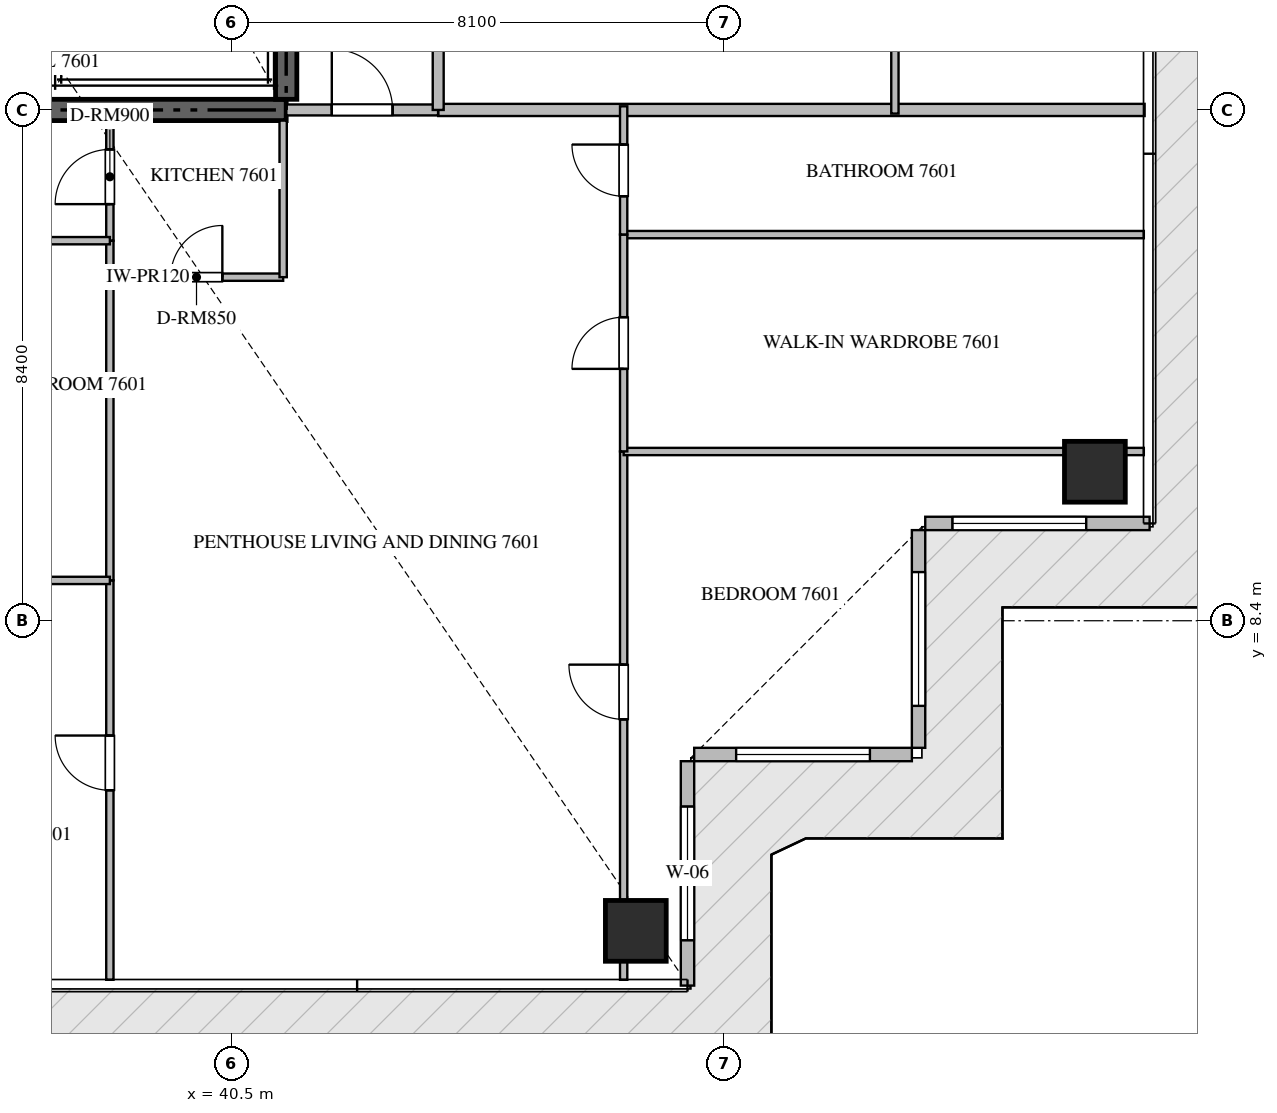
"""IFC4 building model, lengths in metres.
Left out: names, types, materials, properties, quantities, classifications, styles, units other than length and angle.
Written with IfcOpenShell. Run it as: python <this file> out.ifc"""

import sys

from ifc_helpers import new_model, si_unit, direction, frame, frame_2d, origin, origin_2d, place, context, subcontext, project, spatial, rectangle, extrude, source, transform, mapped, element, fill, save


model = new_model("IFC4")
c1 = context("Model", 3, precision=1e-05, world=origin(), true_north=direction((0.0, 1.0)))
c2 = subcontext(c1, "Body", "Model", "MODEL_VIEW")
j1 = project(units=[si_unit("LENGTHUNIT", "METRE"), si_unit("PLANEANGLEUNIT", "RADIAN")], contexts=[c1])
p1 = place(None, origin())
s1 = spatial("IfcSite", under=j1, at=p1, CompositionType="ELEMENT")
p2 = place(p1, origin())
s2 = spatial("IfcBuilding", under=s1, at=p2, CompositionType="ELEMENT")
p3 = place(p2, frame((0.0, 0.0, 305.6)))
s3 = spatial("IfcBuildingStorey", under=s2, at=p3, CompositionType="ELEMENT", Elevation=305.6)
p4 = place(p3, frame((23.4, 16.8, -0.26), z_axis=(0.0, 0.0, 1.0), x_axis=(1.0, 0.0, 0.0)))
e1 = element("IfcWall", 1, at=p4, inside=s3, PredefinedType="SHEAR", context=c2, shape_type="SweptSolid", body=[
    extrude(rectangle(XDim=18.0, YDim=0.35, at=frame_2d((9.0, 0.0))), origin(), (0.0, 0.0, 1.0), 4.048),
])
p5 = place(p3, frame((41.4, 16.975, -0.26), z_axis=(0.0, 0.0, 1.0), x_axis=(0.0, 1.0, 0.0)))
e2 = element("IfcWall", 2, at=p5, inside=s3, PredefinedType="SHEAR", context=c2, shape_type="SweptSolid", body=[
    extrude(rectangle(XDim=8.375, YDim=0.35, at=frame_2d((4.188, 0.0))), origin(), (0.0, 0.0, 1.0), 4.048),
])
m1 = source(origin(), c2, "Body", "SweptSolid", [
    extrude(rectangle(XDim=1.0, YDim=1.0, at=origin_2d()), origin(), (0.0, 0.0, 1.0), 4.05),
])
for number, where, z_axis, x_axis in (
    (3, (47.15, 3.3, -0.26), (0.0, 0.0, 1.0), (1.0, 0.0, 0.0)),
    (4, (54.7, 10.85, -0.26), (0.0, 0.0, 1.0), (1.0, 0.0, 0.0)),
):
    element("IfcColumn", number, at=place(p3, frame(where, z_axis=z_axis, x_axis=x_axis)), inside=s3, PredefinedType="COLUMN", context=c2, shape_type="MappedRepresentation", body=[
        mapped(m1, transform((0.0, 0.0, 0.0), scale=1.0)),
    ])
p6 = place(p3, frame((48.0, 2.4, 0.0), z_axis=(0.0, 0.0, 1.0), x_axis=(0.0, 1.0, 0.0)))
e5 = element("IfcWall", 5, at=p6, inside=s3, PredefinedType="ELEMENTEDWALL", context=c2, shape_type="SweptSolid", body=[
    extrude(rectangle(XDim=3.69, YDim=0.22, at=frame_2d((1.845, 0.0))), origin(), (0.0, 0.0, 1.0), 3.775),
])
p7 = place(p6, frame((0.745, 0.0, 0.65)))
e6 = element("IfcOpeningElement", 6, at=p7, cuts=e5, PredefinedType="OPENING", context=c2, shape_type="SweptSolid", body=[
    extrude(rectangle(XDim=2.2, YDim=2.4, at=frame_2d((1.1, 1.2))), frame((0.0, 0.12, 0.0), z_axis=(0.0, -1.0, 0.0), x_axis=(1.0, 0.0, 0.0)), (0.0, 0.0, 1.0), 0.24),
])
p8 = place(p3, frame((48.11, 6.2, 0.0), z_axis=(0.0, 0.0, 1.0), x_axis=(1.0, 0.0, 0.0)))
e7 = element("IfcWall", 7, at=p8, inside=s3, PredefinedType="ELEMENTEDWALL", context=c2, shape_type="SweptSolid", body=[
    extrude(rectangle(XDim=3.58, YDim=0.22, at=frame_2d((1.79, 0.0))), origin(), (0.0, 0.0, 1.0), 3.775),
])
p9 = place(p8, frame((0.69, 0.0, 0.65)))
e8 = element("IfcOpeningElement", 8, at=p9, cuts=e7, PredefinedType="OPENING", context=c2, shape_type="SweptSolid", body=[
    extrude(rectangle(XDim=2.2, YDim=2.4, at=frame_2d((1.1, 1.2))), frame((0.0, 0.12, 0.0), z_axis=(0.0, -1.0, 0.0), x_axis=(1.0, 0.0, 0.0)), (0.0, 0.0, 1.0), 0.24),
])
p10 = place(p3, frame((51.8, 6.31, 0.0), z_axis=(0.0, 0.0, 1.0), x_axis=(0.0, 1.0, 0.0)))
e9 = element("IfcWall", 9, at=p10, inside=s3, PredefinedType="ELEMENTEDWALL", context=c2, shape_type="SweptSolid", body=[
    extrude(rectangle(XDim=3.58, YDim=0.22, at=frame_2d((1.79, 0.0))), origin(), (0.0, 0.0, 1.0), 3.775),
])
p11 = place(p10, frame((0.69, 0.0, 0.65)))
e10 = element("IfcOpeningElement", 10, at=p11, cuts=e9, PredefinedType="OPENING", context=c2, shape_type="SweptSolid", body=[
    extrude(rectangle(XDim=2.2, YDim=2.4, at=frame_2d((1.1, 1.2))), frame((0.0, 0.12, 0.0), z_axis=(0.0, -1.0, 0.0), x_axis=(1.0, 0.0, 0.0)), (0.0, 0.0, 1.0), 0.24),
])
p12 = place(p3, frame((51.91, 10.0, 0.0), z_axis=(0.0, 0.0, 1.0), x_axis=(1.0, 0.0, 0.0)))
e11 = element("IfcWall", 11, at=p12, inside=s3, PredefinedType="ELEMENTEDWALL", context=c2, shape_type="SweptSolid", body=[
    extrude(rectangle(XDim=3.69, YDim=0.22, at=frame_2d((1.845, 0.0))), origin(), (0.0, 0.0, 1.0), 3.775),
])
p13 = place(p12, frame((0.447, 0.0, 0.65)))
e12 = element("IfcOpeningElement", 12, at=p13, cuts=e11, PredefinedType="OPENING", context=c2, shape_type="SweptSolid", body=[
    extrude(rectangle(XDim=2.2, YDim=2.4, at=frame_2d((1.1, 1.2))), frame((0.0, 0.12, 0.0), z_axis=(0.0, -1.0, 0.0), x_axis=(1.0, 0.0, 0.0)), (0.0, 0.0, 1.0), 0.24),
])
p14 = place(p3, frame((43.9, 16.8, 0.0), z_axis=(0.0, 0.0, 1.0), x_axis=(1.0, 0.0, 0.0)))
e13 = element("IfcWall", 13, at=p14, inside=s3, PredefinedType="PARTITIONING", context=c2, shape_type="SweptSolid", body=[
    extrude(rectangle(XDim=11.618, YDim=0.2, at=frame_2d((5.809, 0.0))), origin(), (0.0, 0.0, 1.0), 3.79),
])
p15 = place(p3, frame((41.402, 16.8, 0.0), z_axis=(0.0, 0.0, 1.0), x_axis=(1.0, 0.0, 0.0)))
e14 = element("IfcWall", 14, at=p15, inside=s3, PredefinedType="PARTITIONING", context=c2, shape_type="SweptSolid", body=[
    extrude(rectangle(XDim=2.496, YDim=0.18, at=frame_2d((1.248, 0.0))), origin(), (0.0, 0.0, 1.0), 3.79),
])
p16 = place(p15, frame((0.748, 0.0, 0.0)))
e15 = element("IfcOpeningElement", 15, at=p16, cuts=e14, PredefinedType="OPENING", context=c2, shape_type="SweptSolid", body=[
    extrude(rectangle(XDim=1.0, YDim=2.15, at=frame_2d((0.5, 1.075))), frame((0.0, 0.1, 0.0), z_axis=(0.0, -1.0, 0.0), x_axis=(1.0, 0.0, 0.0)), (0.0, 0.0, 1.0), 0.2),
])
p17 = place(p3, frame((43.9, 16.8, 0.0), z_axis=(0.0, 0.0, 1.0), x_axis=(0.0, 1.0, 0.0)))
e16 = element("IfcWall", 16, at=p17, inside=s3, PredefinedType="PARTITIONING", context=c2, shape_type="SweptSolid", body=[
    extrude(rectangle(XDim=16.8, YDim=0.18, at=frame_2d((8.4, 0.0))), origin(), (0.0, 0.0, 1.0), 3.79),
])
p18 = place(p17, frame((14.5, 0.0, 0.0)))
e17 = element("IfcOpeningElement", 17, at=p18, cuts=e16, PredefinedType="OPENING", context=c2, shape_type="SweptSolid", body=[
    extrude(rectangle(XDim=1.0, YDim=2.15, at=frame_2d((0.5, 1.075))), frame((0.0, 0.1, 0.0), z_axis=(0.0, -1.0, 0.0), x_axis=(1.0, 0.0, 0.0)), (0.0, 0.0, 1.0), 0.2),
])
p19 = place(p3, frame((38.5, 14.05, 0.0), z_axis=(0.0, 0.0, 1.0), x_axis=(1.0, 0.0, 0.0)))
e18 = element("IfcWall", 18, at=p19, inside=s3, PredefinedType="PARTITIONING", context=c2, shape_type="SweptSolid", body=[
    extrude(rectangle(XDim=2.85, YDim=0.12, at=frame_2d((1.425, 0.0))), origin(), (0.0, 0.0, 1.0), 3.512),
])
p20 = place(p19, frame((1.0, 0.0, 0.0)))
e19 = element("IfcOpeningElement", 19, at=p20, cuts=e18, PredefinedType="OPENING", context=c2, shape_type="SweptSolid", body=[
    extrude(rectangle(XDim=0.85, YDim=2.1, at=frame_2d((0.425, 1.05))), frame((0.0, 0.07, 0.0), z_axis=(0.0, -1.0, 0.0), x_axis=(1.0, 0.0, 0.0)), (0.0, 0.0, 1.0), 0.14),
])
p21 = place(p3, frame((41.35, 14.05, 0.0), z_axis=(0.0, 0.0, 1.0), x_axis=(0.0, 1.0, 0.0)))
e20 = element("IfcWall", 20, at=p21, inside=s3, PredefinedType="PARTITIONING", context=c2, shape_type="SweptSolid", body=[
    extrude(rectangle(XDim=2.575, YDim=0.12, at=frame_2d((1.288, 0.0))), origin(), (0.0, 0.0, 1.0), 3.79),
])
p22 = place(p3, frame((38.5, 14.65, 0.0), z_axis=(0.0, 0.0, 1.0), x_axis=(0.0, 1.0, 0.0)))
e21 = element("IfcWall", 21, at=p22, inside=s3, PredefinedType="PARTITIONING", context=c2, shape_type="SweptSolid", body=[
    extrude(rectangle(XDim=1.975, YDim=0.12, at=frame_2d((0.988, 0.0))), origin(), (0.0, 0.0, 1.0), 3.79),
])
p23 = place(p22, frame((0.601, 0.0, 0.0)))
e22 = element("IfcOpeningElement", 22, at=p23, cuts=e21, PredefinedType="OPENING", context=c2, shape_type="SweptSolid", body=[
    extrude(rectangle(XDim=0.9, YDim=2.1, at=frame_2d((0.45, 1.05))), frame((0.0, 0.07, 0.0), z_axis=(0.0, -1.0, 0.0), x_axis=(1.0, 0.0, 0.0)), (0.0, 0.0, 1.0), 0.14),
])
p24 = place(p3, frame((38.5, 2.495, 0.0), z_axis=(0.0, 0.0, 1.0), x_axis=(0.0, 1.0, 0.0)))
e23 = element("IfcWall", 23, at=p24, inside=s3, PredefinedType="PARTITIONING", context=c2, shape_type="SweptSolid", body=[
    extrude(rectangle(XDim=6.568, YDim=0.12, at=frame_2d((3.284, 0.0))), origin(), (0.0, 0.0, 1.0), 3.79),
])
p25 = place(p24, frame((3.117, 0.0, 0.0)))
e24 = element("IfcOpeningElement", 24, at=p25, cuts=e23, PredefinedType="OPENING", context=c2, shape_type="SweptSolid", body=[
    extrude(rectangle(XDim=0.9, YDim=2.1, at=frame_2d((0.45, 1.05))), frame((0.0, 0.07, 0.0), z_axis=(0.0, -1.0, 0.0), x_axis=(1.0, 0.0, 0.0)), (0.0, 0.0, 1.0), 0.14),
])
p26 = place(p3, frame((38.5, 9.065, 0.0), z_axis=(0.0, 0.0, 1.0), x_axis=(0.0, 1.0, 0.0)))
e25 = element("IfcWall", 25, at=p26, inside=s3, PredefinedType="PARTITIONING", context=c2, shape_type="SweptSolid", body=[
    extrude(rectangle(XDim=5.583, YDim=0.12, at=frame_2d((2.792, 0.0))), origin(), (0.0, 0.0, 1.0), 3.79),
])
p27 = place(p3, frame((33.35, 9.063, 0.0), z_axis=(0.0, 0.0, 1.0), x_axis=(1.0, 0.0, 0.0)))
e26 = element("IfcWall", 26, at=p27, inside=s3, PredefinedType="PARTITIONING", context=c2, shape_type="SweptSolid", body=[
    extrude(rectangle(XDim=5.15, YDim=0.12, at=frame_2d((2.575, 0.0))), origin(), (0.0, 0.0, 1.0), 3.79),
])
p28 = place(p3, frame((35.452, 14.65, 0.0), z_axis=(0.0, 0.0, 1.0), x_axis=(1.0, 0.0, 0.0)))
e27 = element("IfcWall", 27, at=p28, inside=s3, PredefinedType="PARTITIONING", context=c2, shape_type="SweptSolid", body=[
    extrude(rectangle(XDim=3.048, YDim=0.12, at=frame_2d((1.524, 0.0))), origin(), (0.0, 0.0, 1.0), 3.79),
])
p29 = place(p28, frame((1.099, 0.0, 0.0)))
e28 = element("IfcOpeningElement", 28, at=p29, cuts=e27, PredefinedType="OPENING", context=c2, shape_type="SweptSolid", body=[
    extrude(rectangle(XDim=0.85, YDim=2.1, at=frame_2d((0.425, 1.05))), frame((0.0, 0.07, 0.0), z_axis=(0.0, -1.0, 0.0), x_axis=(1.0, 0.0, 0.0)), (0.0, 0.0, 1.0), 0.14),
])
p30 = place(p3, frame((46.95, 2.495, 0.0), z_axis=(0.0, 0.0, 1.0), x_axis=(0.0, 1.0, 0.0)))
e29 = element("IfcWall", 29, at=p30, inside=s3, PredefinedType="PARTITIONING", context=c2, shape_type="SweptSolid", body=[
    extrude(rectangle(XDim=8.688, YDim=0.12, at=frame_2d((4.344, 0.0))), origin(), (0.0, 0.0, 1.0), 3.292),
])
p31 = place(p30, frame((4.283, 0.0, 0.0)))
e30 = element("IfcOpeningElement", 30, at=p31, cuts=e29, PredefinedType="OPENING", context=c2, shape_type="SweptSolid", body=[
    extrude(rectangle(XDim=0.9, YDim=2.1, at=frame_2d((0.45, 1.05))), frame((0.0, 0.07, 0.0), z_axis=(0.0, -1.0, 0.0), x_axis=(1.0, 0.0, 0.0)), (0.0, 0.0, 1.0), 0.14),
])
for number, where, z_axis, x_axis in (
    (31, (46.95, 11.183, 0.0), (0.0, 0.0, 1.0), (1.0, 0.0, 0.0)),
    (32, (46.95, 14.75, 0.0), (0.0, 0.0, 1.0), (1.0, 0.0, 0.0)),
):
    element("IfcWall", number, at=place(p3, frame(where, z_axis=z_axis, x_axis=x_axis)), inside=s3, PredefinedType="PARTITIONING", context=c2, shape_type="SweptSolid", body=[
        extrude(rectangle(XDim=8.555, YDim=0.12, at=frame_2d((4.277, 0.0))), origin(), (0.0, 0.0, 1.0), 3.79),
    ])
p32 = place(p3, frame((46.95, 11.185, 0.0), z_axis=(0.0, 0.0, 1.0), x_axis=(0.0, 1.0, 0.0)))
e33 = element("IfcWall", 33, at=p32, inside=s3, PredefinedType="PARTITIONING", context=c2, shape_type="SweptSolid", body=[
    extrude(rectangle(XDim=3.565, YDim=0.12, at=frame_2d((1.782, 0.0))), origin(), (0.0, 0.0, 1.0), 3.372),
])
p33 = place(p32, frame((1.357, 0.0, 0.0)))
e34 = element("IfcOpeningElement", 34, at=p33, cuts=e33, PredefinedType="OPENING", context=c2, shape_type="SweptSolid", body=[
    extrude(rectangle(XDim=0.85, YDim=2.1, at=frame_2d((0.425, 1.05))), frame((0.0, 0.07, 0.0), z_axis=(0.0, -1.0, 0.0), x_axis=(1.0, 0.0, 0.0)), (0.0, 0.0, 1.0), 0.14),
])
p34 = place(p3, frame((46.95, 14.752, 0.0), z_axis=(0.0, 0.0, 1.0), x_axis=(0.0, 1.0, 0.0)))
e35 = element("IfcWall", 35, at=p34, inside=s3, PredefinedType="PARTITIONING", context=c2, shape_type="SweptSolid", body=[
    extrude(rectangle(XDim=2.108, YDim=0.12, at=frame_2d((1.054, 0.0))), origin(), (0.0, 0.0, 1.0), 3.372),
])
p35 = place(p34, frame((0.629, 0.0, 0.0)))
e36 = element("IfcOpeningElement", 36, at=p35, cuts=e35, PredefinedType="OPENING", context=c2, shape_type="SweptSolid", body=[
    extrude(rectangle(XDim=0.85, YDim=2.1, at=frame_2d((0.425, 1.05))), frame((0.0, 0.07, 0.0), z_axis=(0.0, -1.0, 0.0), x_axis=(1.0, 0.0, 0.0)), (0.0, 0.0, 1.0), 0.14),
])
p36 = place(p3, frame((51.411, 16.74, 0.0), z_axis=(0.0, 0.0, 1.0), x_axis=(0.0, 1.0, 0.0)))
e37 = element("IfcWall", 37, at=p36, inside=s3, PredefinedType="PARTITIONING", context=c2, shape_type="SweptSolid", body=[
    extrude(rectangle(XDim=10.48, YDim=0.12, at=frame_2d((5.24, 0.0))), origin(), (0.0, 0.0, 1.0), 3.79),
])
m2 = source(origin(), c2, "Body", "SweptSolid", [
    extrude(rectangle(XDim=2.2, YDim=2.4, at=frame_2d((1.1, 1.2))), frame((0.0, 0.03, 0.0), z_axis=(0.0, -1.0, 0.0), x_axis=(1.0, 0.0, 0.0)), (0.0, 0.0, 1.0), 0.06),
])
p37 = place(p7, origin())
e38 = element("IfcWindow", 38, at=p37, inside=s3, PartitioningType="SINGLE_PANEL", PredefinedType="WINDOW", context=c2, shape_type="MappedRepresentation", body=[
    mapped(m2, transform((0.0, 0.0, 0.0), scale=1.0)),
])
fill(e6, e38)
p38 = place(p9, origin())
e39 = element("IfcWindow", 39, at=p38, inside=s3, PartitioningType="SINGLE_PANEL", PredefinedType="WINDOW", context=c2, shape_type="MappedRepresentation", body=[
    mapped(m2, transform((0.0, 0.0, 0.0), scale=1.0)),
])
fill(e8, e39)
p39 = place(p11, origin())
e40 = element("IfcWindow", 40, at=p39, inside=s3, PartitioningType="SINGLE_PANEL", PredefinedType="WINDOW", context=c2, shape_type="MappedRepresentation", body=[
    mapped(m2, transform((0.0, 0.0, 0.0), scale=1.0)),
])
fill(e10, e40)
p40 = place(p13, origin())
e41 = element("IfcWindow", 41, at=p40, inside=s3, PartitioningType="SINGLE_PANEL", PredefinedType="WINDOW", context=c2, shape_type="MappedRepresentation", body=[
    mapped(m2, transform((0.0, 0.0, 0.0), scale=1.0)),
])
fill(e12, e41)
m3 = source(origin(), c2, "Body", "SweptSolid", [
    extrude(rectangle(XDim=1.0, YDim=2.15, at=frame_2d((0.5, 1.075))), frame((0.0, 0.025, 0.0), z_axis=(0.0, -1.0, 0.0), x_axis=(1.0, 0.0, 0.0)), (0.0, 0.0, 1.0), 0.05),
])
p41 = place(p16, origin())
e42 = element("IfcDoor", 42, at=p41, inside=s3, OperationType="SINGLE_SWING_LEFT", PredefinedType="DOOR", context=c2, shape_type="MappedRepresentation", body=[
    mapped(m3, transform((0.0, 0.0, 0.0), scale=1.0)),
])
fill(e15, e42)
m4 = source(origin(), c2, "Body", "SweptSolid", [
    extrude(rectangle(XDim=0.85, YDim=2.1, at=frame_2d((0.425, 1.05))), frame((0.0, 0.025, 0.0), z_axis=(0.0, -1.0, 0.0), x_axis=(1.0, 0.0, 0.0)), (0.0, 0.0, 1.0), 0.05),
])
p42 = place(p20, origin())
e43 = element("IfcDoor", 43, at=p42, inside=s3, OperationType="SINGLE_SWING_RIGHT", PredefinedType="DOOR", context=c2, shape_type="MappedRepresentation", body=[
    mapped(m4, transform((0.0, 0.0, 0.0), scale=1.0)),
])
fill(e19, e43)
m5 = source(origin(), c2, "Body", "SweptSolid", [
    extrude(rectangle(XDim=0.9, YDim=2.1, at=frame_2d((0.45, 1.05))), frame((0.0, 0.025, 0.0), z_axis=(0.0, -1.0, 0.0), x_axis=(1.0, 0.0, 0.0)), (0.0, 0.0, 1.0), 0.05),
])
p43 = place(p23, origin())
e44 = element("IfcDoor", 44, at=p43, inside=s3, OperationType="SINGLE_SWING_LEFT", PredefinedType="DOOR", context=c2, shape_type="MappedRepresentation", body=[
    mapped(m5, transform((0.0, 0.0, 0.0), scale=1.0)),
])
fill(e22, e44)
p44 = place(p25, origin())
e45 = element("IfcDoor", 45, at=p44, inside=s3, OperationType="SINGLE_SWING_RIGHT", PredefinedType="DOOR", context=c2, shape_type="MappedRepresentation", body=[
    mapped(m5, transform((0.0, 0.0, 0.0), scale=1.0)),
])
fill(e24, e45)
p45 = place(p31, origin())
e46 = element("IfcDoor", 46, at=p45, inside=s3, OperationType="SINGLE_SWING_RIGHT", PredefinedType="DOOR", context=c2, shape_type="MappedRepresentation", body=[
    mapped(m5, transform((0.0, 0.0, 0.0), scale=1.0)),
])
fill(e30, e46)
p46 = place(p33, origin())
e47 = element("IfcDoor", 47, at=p46, inside=s3, OperationType="SINGLE_SWING_LEFT", PredefinedType="DOOR", context=c2, shape_type="MappedRepresentation", body=[
    mapped(m4, transform((0.0, 0.0, 0.0), scale=1.0)),
])
fill(e34, e47)
p47 = place(p35, origin())
e48 = element("IfcDoor", 48, at=p47, inside=s3, OperationType="SINGLE_SWING_RIGHT", PredefinedType="DOOR", context=c2, shape_type="MappedRepresentation", body=[
    mapped(m4, transform((0.0, 0.0, 0.0), scale=1.0)),
])
fill(e36, e48)
save(model, sys.argv[1])
